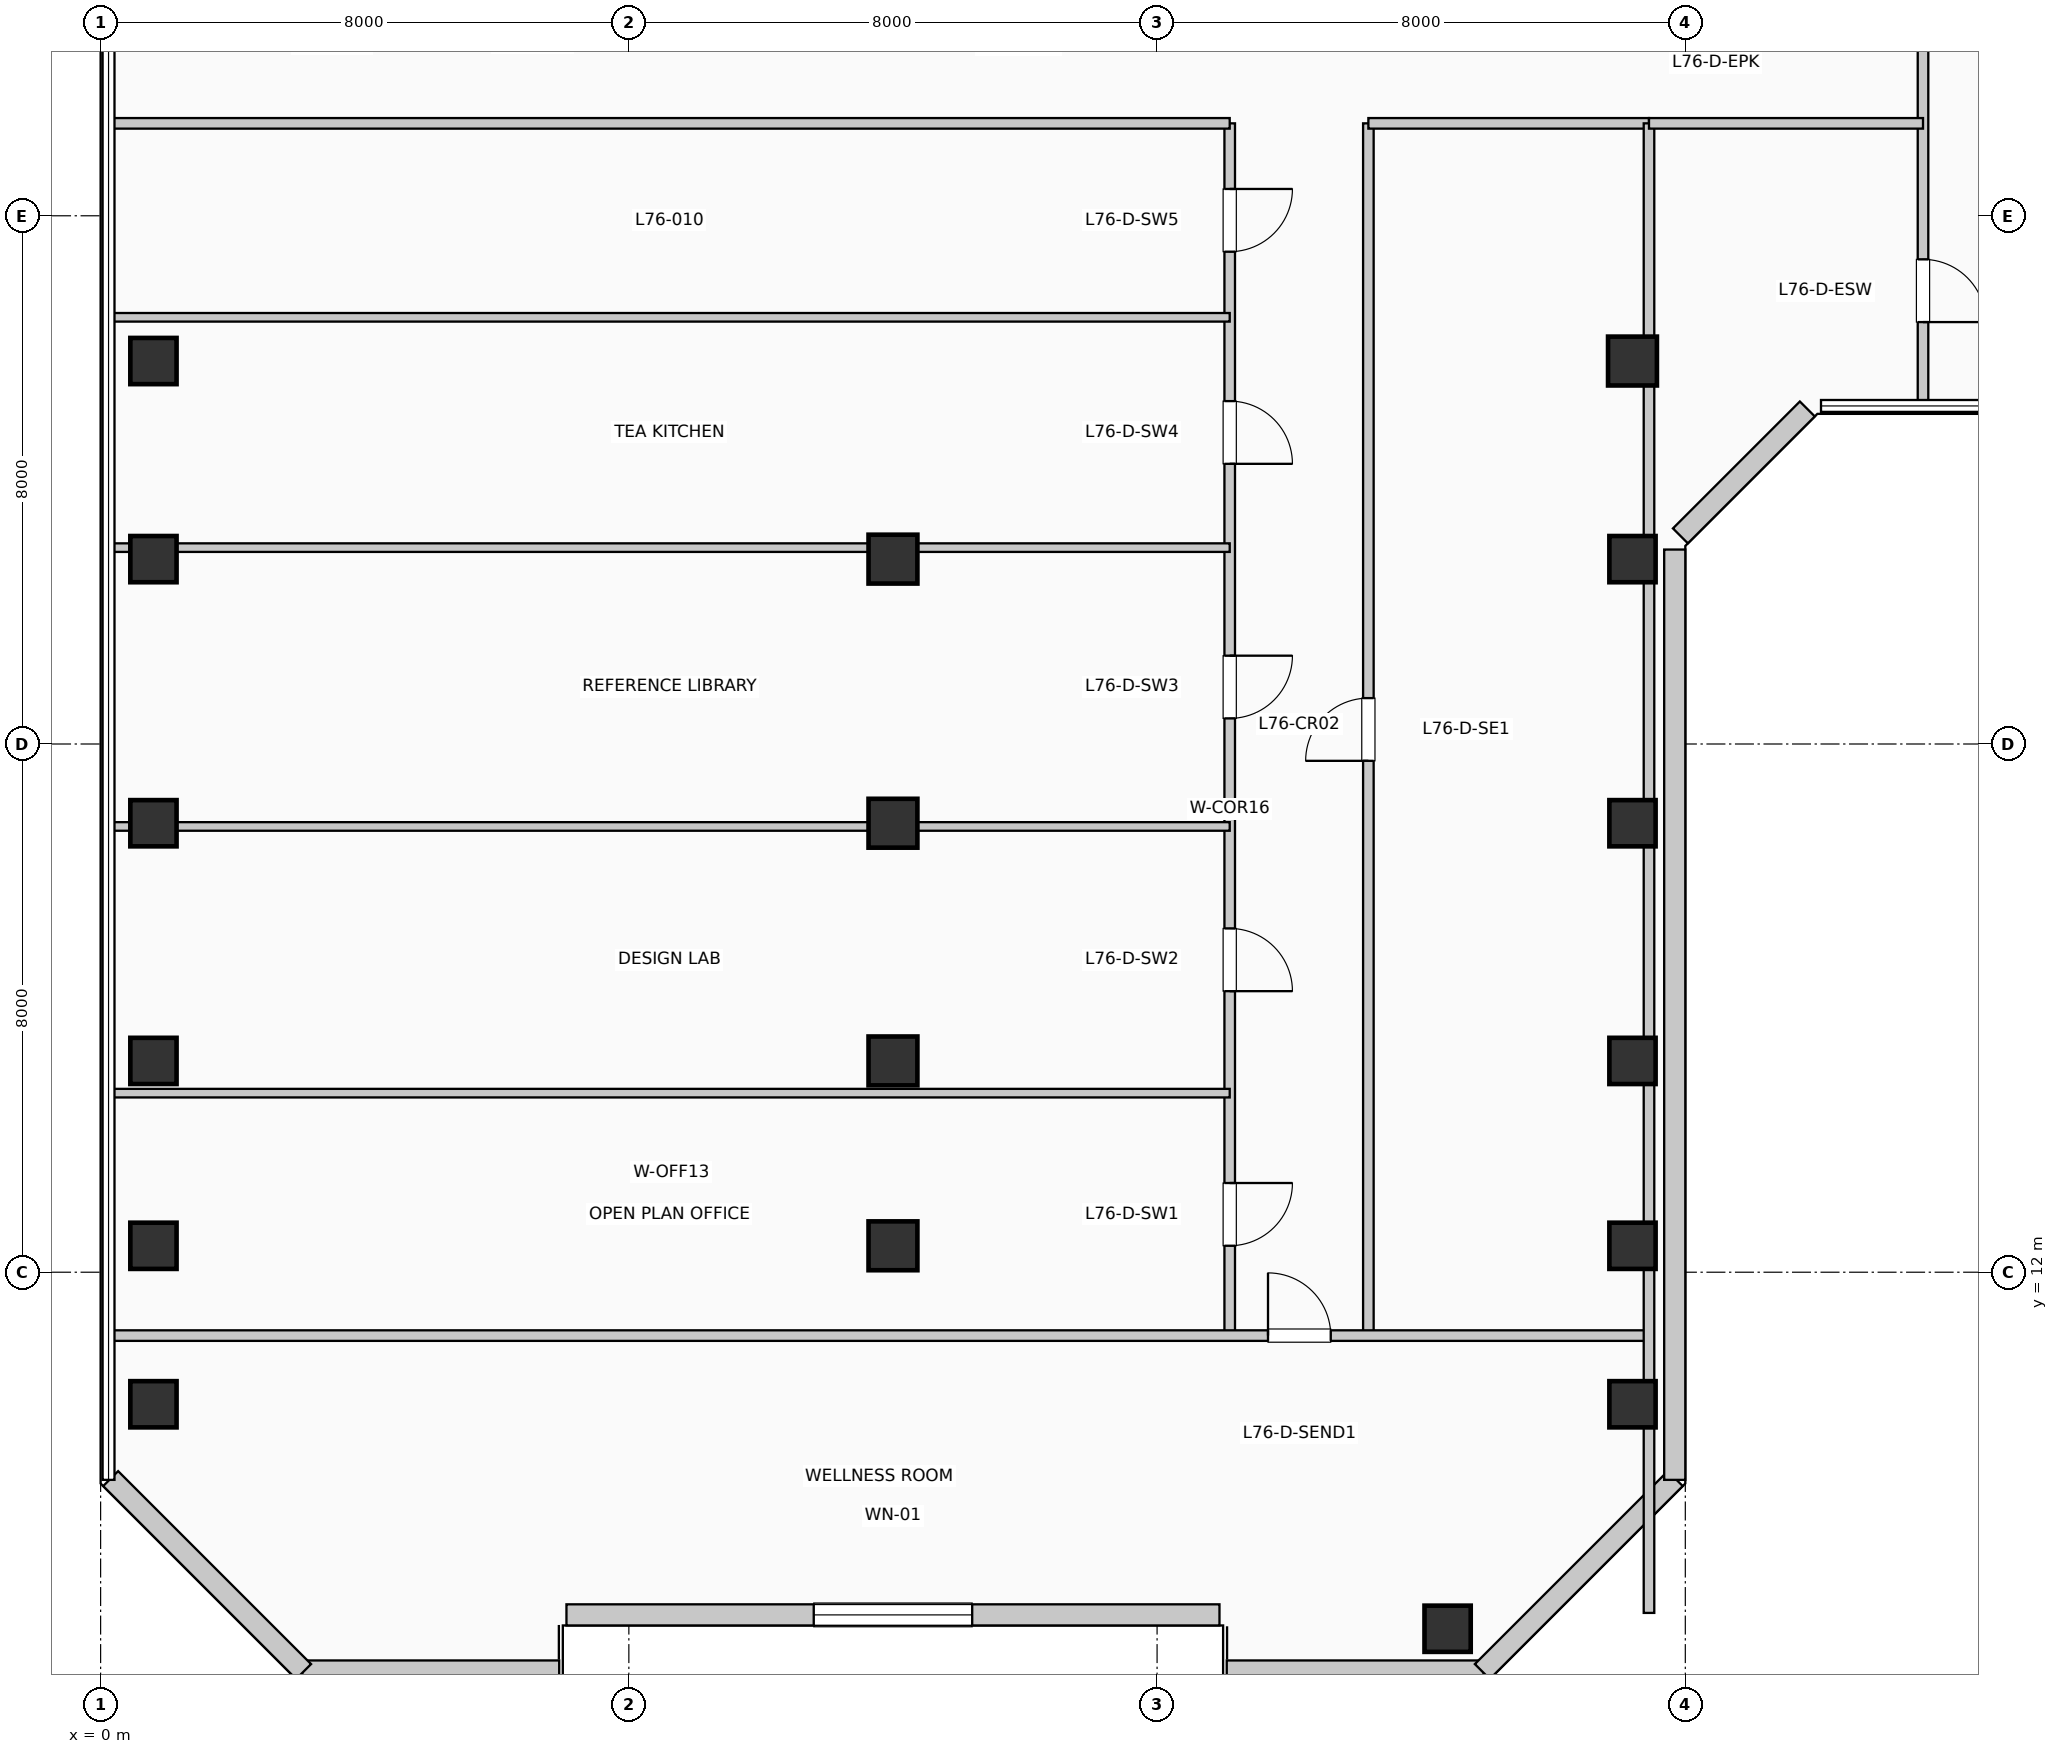
"""IFC4 building model, lengths in metres.
Left out: names, types, materials, properties, quantities, classifications, styles, units other than length and angle.
Written with IfcOpenShell. Run it as: python <this file> out.ifc"""

import sys

from ifc_helpers import new_model, si_unit, direction, frame, frame_2d, origin, origin_2d, place, context, subcontext, project, spatial, rectangle, extrude, element, fill, save


model = new_model("IFC4")
c1 = context("Model", 3, precision=1e-05, world=origin(), true_north=direction((0.0, 1.0)))
c2 = subcontext(c1, "Body", "Model", "MODEL_VIEW")
j1 = project(units=[si_unit("LENGTHUNIT", "METRE"), si_unit("PLANEANGLEUNIT", "RADIAN")], contexts=[c1])
p1 = place(None, origin())
s1 = spatial("IfcSite", under=j1, at=p1, CompositionType="ELEMENT")
p2 = place(p1, origin())
s2 = spatial("IfcBuilding", under=s1, at=p2, CompositionType="ELEMENT")
p3 = place(p2, frame((0.0, 0.0, 311.85)))
s3 = spatial("IfcBuildingStorey", under=s2, at=p3, CompositionType="ELEMENT", Elevation=311.85)
for number, where, z_axis, x_axis in (
    (1, (0.8, 10.0, 0.0), (0.0, 0.0, 1.0), (1.0, 0.0, 0.0)),
    (2, (0.8, 12.4, 0.0), (0.0, 0.0, 1.0), (1.0, 0.0, 0.0)),
    (3, (0.8, 15.2, 0.0), (0.0, 0.0, 1.0), (1.0, 0.0, 0.0)),
    (4, (0.8, 18.8, 0.0), (0.0, 0.0, 1.0), (1.0, 0.0, 0.0)),
    (5, (0.8, 22.8, 0.0), (0.0, 0.0, 1.0), (1.0, 0.0, 0.0)),
    (6, (0.8, 25.8, 0.0), (0.0, 0.0, 1.0), (1.0, 0.0, 0.0)),
):
    element("IfcColumn", number, at=place(p3, frame(where, z_axis=z_axis, x_axis=x_axis)), inside=s3, PredefinedType="COLUMN", context=c2, shape_type="SweptSolid", body=[
        extrude(rectangle(XDim=0.7, YDim=0.7, at=origin_2d()), origin(), (0.0, 0.0, 1.0), 3.96),
    ])
for number, where, z_axis, x_axis in (
    (7, (12.0, 12.4, 0.0), (0.0, 0.0, 1.0), (1.0, 0.0, 0.0)),
    (8, (12.0, 15.2, 0.0), (0.0, 0.0, 1.0), (1.0, 0.0, 0.0)),
    (9, (12.0, 18.8, 0.0), (0.0, 0.0, 1.0), (1.0, 0.0, 0.0)),
    (10, (12.0, 22.8, 0.0), (0.0, 0.0, 1.0), (1.0, 0.0, 0.0)),
):
    element("IfcColumn", number, at=place(p3, frame(where, z_axis=z_axis, x_axis=x_axis)), inside=s3, PredefinedType="COLUMN", context=c2, shape_type="SweptSolid", body=[
        extrude(rectangle(XDim=0.74, YDim=0.74, at=origin_2d()), origin(), (0.0, 0.0, 1.0), 3.96),
    ])
for number, where, z_axis, x_axis in (
    (11, (20.4, 6.6, 0.0), (0.0, 0.0, 1.0), (1.0, 0.0, 0.0)),
    (12, (23.2, 10.0, 0.0), (0.0, 0.0, 1.0), (1.0, 0.0, 0.0)),
    (13, (23.2, 12.4, 0.0), (0.0, 0.0, 1.0), (1.0, 0.0, 0.0)),
    (14, (23.2, 15.2, 0.0), (0.0, 0.0, 1.0), (1.0, 0.0, 0.0)),
    (15, (23.2, 18.8, 0.0), (0.0, 0.0, 1.0), (1.0, 0.0, 0.0)),
    (16, (23.2, 22.8, 0.0), (0.0, 0.0, 1.0), (1.0, 0.0, 0.0)),
):
    element("IfcColumn", number, at=place(p3, frame(where, z_axis=z_axis, x_axis=x_axis)), inside=s3, PredefinedType="COLUMN", context=c2, shape_type="SweptSolid", body=[
        extrude(rectangle(XDim=0.7, YDim=0.7, at=origin_2d()), origin(), (0.0, 0.0, 1.0), 3.96),
    ])
p4 = place(p3, frame((23.2, 25.8, 0.0), z_axis=(0.0, 0.0, 1.0), x_axis=(1.0, 0.0, 0.0)))
e17 = element("IfcColumn", 17, at=p4, inside=s3, PredefinedType="COLUMN", context=c2, shape_type="SweptSolid", body=[
    extrude(rectangle(XDim=0.74, YDim=0.74, at=origin_2d()), origin(), (0.0, 0.0, 1.0), 3.96),
])
p5 = place(p3, frame((3.055, 5.96, 0.0), z_axis=(0.0, 0.0, 1.0), x_axis=(1.0, 0.0, 0.0)))
e18 = element("IfcWall", 18, at=p5, inside=s3, PredefinedType="SOLIDWALL", context=c2, shape_type="SweptSolid", body=[
    extrude(rectangle(XDim=3.89, YDim=0.32, at=frame_2d((1.945, 0.0))), origin(), (0.0, 0.0, 1.0), 3.74),
])
p6 = place(p3, frame((7.055, 6.81, 0.0), z_axis=(0.0, 0.0, 1.0), x_axis=(1.0, 0.0, 0.0)))
e19 = element("IfcWall", 19, at=p6, inside=s3, PredefinedType="SOLIDWALL", context=c2, shape_type="SweptSolid", body=[
    extrude(rectangle(XDim=9.89, YDim=0.32, at=frame_2d((4.945, 0.0))), origin(), (0.0, 0.0, 1.0), 3.74),
])
p7 = place(p6, frame((3.745, 0.0, 0.85)))
e20 = element("IfcOpeningElement", 20, at=p7, cuts=e19, PredefinedType="OPENING", context=c2, shape_type="SweptSolid", body=[
    extrude(rectangle(XDim=2.4, YDim=2.05, at=frame_2d((1.2, 1.025))), frame((0.0, 0.17, 0.0), z_axis=(0.0, -1.0, 0.0), x_axis=(1.0, 0.0, 0.0)), (0.0, 0.0, 1.0), 0.34),
])
p8 = place(p3, frame((17.055, 5.96, 0.0), z_axis=(0.0, 0.0, 1.0), x_axis=(1.0, 0.0, 0.0)))
e21 = element("IfcWall", 21, at=p8, inside=s3, PredefinedType="SOLIDWALL", context=c2, shape_type="SweptSolid", body=[
    extrude(rectangle(XDim=3.89, YDim=0.32, at=frame_2d((1.945, 0.0))), origin(), (0.0, 0.0, 1.0), 3.74),
])
p9 = place(p3, frame((20.926, 5.952, 0.0), z_axis=(0.0, 0.0, 1.0), x_axis=(0.707077242712, 0.707136318428, 0.0)))
e22 = element("IfcWall", 22, at=p9, inside=s3, PredefinedType="SOLIDWALL", context=c2, shape_type="SweptSolid", body=[
    extrude(rectangle(XDim=4.133, YDim=0.32, at=frame_2d((2.066, 0.0))), origin(), (0.0, 0.0, 1.0), 3.74),
])
p10 = place(p3, frame((23.84, 8.855, 0.0), z_axis=(0.0, 0.0, 1.0), x_axis=(0.0, 1.0, 0.0)))
e23 = element("IfcWall", 23, at=p10, inside=s3, PredefinedType="SOLIDWALL", context=c2, shape_type="SweptSolid", body=[
    extrude(rectangle(XDim=14.09, YDim=0.32, at=frame_2d((7.045, 0.0))), origin(), (0.0, 0.0, 1.0), 3.74),
])
p11 = place(p3, frame((23.926, 23.152, 0.0), z_axis=(0.0, 0.0, 1.0), x_axis=(0.707106781187, 0.707106781187, 0.0)))
e24 = element("IfcWall", 24, at=p11, inside=s3, PredefinedType="SOLIDWALL", context=c2, shape_type="SweptSolid", body=[
    extrude(rectangle(XDim=2.718, YDim=0.32, at=frame_2d((1.359, 0.0))), origin(), (0.0, 0.0, 1.0), 3.74),
])
p12 = place(p3, frame((0.152, 8.874, 0.0), z_axis=(0.0, 0.0, 1.0), x_axis=(0.707077242712, -0.707136318428, 0.0)))
e25 = element("IfcWall", 25, at=p12, inside=s3, PredefinedType="SOLIDWALL", context=c2, shape_type="SweptSolid", body=[
    extrude(rectangle(XDim=4.133, YDim=0.32, at=frame_2d((2.066, 0.0))), origin(), (0.0, 0.0, 1.0), 3.74),
])
p13 = place(p3, frame((17.1, 11.04, 0.0), z_axis=(0.0, 0.0, 1.0), x_axis=(0.0, 1.0, 0.0)))
e26 = element("IfcWall", 26, at=p13, inside=s3, PredefinedType="PARTITIONING", context=c2, shape_type="SweptSolid", body=[
    extrude(rectangle(XDim=18.36, YDim=0.16, at=frame_2d((9.18, 0.0))), origin(), (0.0, 0.0, 1.0), 3.74),
])
p14 = place(p13, frame((2.311, 0.0, 0.0), z_axis=(0.0, 0.0, 1.0), x_axis=(-1.0, 0.0, 0.0)))
e27 = element("IfcOpeningElement", 27, at=p14, cuts=e26, PredefinedType="OPENING", context=c2, shape_type="SweptSolid", body=[
    extrude(rectangle(XDim=0.95, YDim=2.15, at=frame_2d((0.475, 1.075))), frame((0.0, 0.09, 0.0), z_axis=(0.0, -1.0, 0.0), x_axis=(1.0, 0.0, 0.0)), (0.0, 0.0, 1.0), 0.18),
])
p15 = place(p13, frame((6.167, 0.0, 0.0), z_axis=(0.0, 0.0, 1.0), x_axis=(-1.0, 0.0, 0.0)))
e28 = element("IfcOpeningElement", 28, at=p15, cuts=e26, PredefinedType="OPENING", context=c2, shape_type="SweptSolid", body=[
    extrude(rectangle(XDim=0.95, YDim=2.15, at=frame_2d((0.475, 1.075))), frame((0.0, 0.09, 0.0), z_axis=(0.0, -1.0, 0.0), x_axis=(1.0, 0.0, 0.0)), (0.0, 0.0, 1.0), 0.18),
])
p16 = place(p13, frame((10.298, 0.0, 0.0), z_axis=(0.0, 0.0, 1.0), x_axis=(-1.0, 0.0, 0.0)))
e29 = element("IfcOpeningElement", 29, at=p16, cuts=e26, PredefinedType="OPENING", context=c2, shape_type="SweptSolid", body=[
    extrude(rectangle(XDim=0.95, YDim=2.15, at=frame_2d((0.475, 1.075))), frame((0.0, 0.09, 0.0), z_axis=(0.0, -1.0, 0.0), x_axis=(1.0, 0.0, 0.0)), (0.0, 0.0, 1.0), 0.18),
])
p17 = place(p13, frame((14.153, 0.0, 0.0), z_axis=(0.0, 0.0, 1.0), x_axis=(-1.0, 0.0, 0.0)))
e30 = element("IfcOpeningElement", 30, at=p17, cuts=e26, PredefinedType="OPENING", context=c2, shape_type="SweptSolid", body=[
    extrude(rectangle(XDim=0.95, YDim=2.15, at=frame_2d((0.475, 1.075))), frame((0.0, 0.09, 0.0), z_axis=(0.0, -1.0, 0.0), x_axis=(1.0, 0.0, 0.0)), (0.0, 0.0, 1.0), 0.18),
])
p18 = place(p13, frame((17.366, 0.0, 0.0), z_axis=(0.0, 0.0, 1.0), x_axis=(-1.0, 0.0, 0.0)))
e31 = element("IfcOpeningElement", 31, at=p18, cuts=e26, PredefinedType="OPENING", context=c2, shape_type="SweptSolid", body=[
    extrude(rectangle(XDim=0.95, YDim=2.15, at=frame_2d((0.475, 1.075))), frame((0.0, 0.09, 0.0), z_axis=(0.0, -1.0, 0.0), x_axis=(1.0, 0.0, 0.0)), (0.0, 0.0, 1.0), 0.18),
])
p19 = place(p3, frame((19.2, 11.04, 0.0), z_axis=(0.0, 0.0, 1.0), x_axis=(0.0, 1.0, 0.0)))
e32 = element("IfcWall", 32, at=p19, inside=s3, PredefinedType="PARTITIONING", context=c2, shape_type="SweptSolid", body=[
    extrude(rectangle(XDim=18.36, YDim=0.16, at=frame_2d((9.18, 0.0))), origin(), (0.0, 0.0, 1.0), 3.74),
])
p20 = place(p19, frame((8.705, 0.0, 0.0)))
e33 = element("IfcOpeningElement", 33, at=p20, cuts=e32, PredefinedType="OPENING", context=c2, shape_type="SweptSolid", body=[
    extrude(rectangle(XDim=0.95, YDim=2.15, at=frame_2d((0.475, 1.075))), frame((0.0, 0.09, 0.0), z_axis=(0.0, -1.0, 0.0), x_axis=(1.0, 0.0, 0.0)), (0.0, 0.0, 1.0), 0.18),
])
p21 = place(p3, frame((0.19, 11.04, 0.0), z_axis=(0.0, 0.0, 1.0), x_axis=(1.0, 0.0, 0.0)))
e34 = element("IfcWall", 34, at=p21, inside=s3, PredefinedType="PARTITIONING", context=c2, shape_type="SweptSolid", body=[
    extrude(rectangle(XDim=23.26, YDim=0.16, at=frame_2d((11.63, 0.0))), origin(), (0.0, 0.0, 1.0), 3.74),
])
p22 = place(p21, frame((17.49, 0.0, 0.0)))
e35 = element("IfcOpeningElement", 35, at=p22, cuts=e34, PredefinedType="OPENING", context=c2, shape_type="SweptSolid", body=[
    extrude(rectangle(XDim=0.95, YDim=2.15, at=frame_2d((0.475, 1.075))), frame((0.0, 0.09, 0.0), z_axis=(0.0, -1.0, 0.0), x_axis=(1.0, 0.0, 0.0)), (0.0, 0.0, 1.0), 0.18),
])
p23 = place(p3, frame((0.19, 29.4, 0.0), z_axis=(0.0, 0.0, 1.0), x_axis=(1.0, 0.0, 0.0)))
e36 = element("IfcWall", 36, at=p23, inside=s3, PredefinedType="PARTITIONING", context=c2, shape_type="SweptSolid", body=[
    extrude(rectangle(XDim=16.91, YDim=0.16, at=frame_2d((8.455, 0.0))), origin(), (0.0, 0.0, 1.0), 3.425),
])
p24 = place(p3, frame((19.2, 29.4, 0.0), z_axis=(0.0, 0.0, 1.0), x_axis=(1.0, 0.0, 0.0)))
e37 = element("IfcWall", 37, at=p24, inside=s3, PredefinedType="PARTITIONING", context=c2, shape_type="SweptSolid", body=[
    extrude(rectangle(XDim=4.25, YDim=0.16, at=frame_2d((2.125, 0.0))), origin(), (0.0, 0.0, 1.0), 3.425),
])
p25 = place(p3, frame((23.45, 6.84, 0.0), z_axis=(0.0, 0.0, 1.0), x_axis=(0.0, 1.0, 0.0)))
e38 = element("IfcWall", 38, at=p25, inside=s3, PredefinedType="PARTITIONING", context=c2, shape_type="SweptSolid", body=[
    extrude(rectangle(XDim=22.56, YDim=0.16, at=frame_2d((11.28, 0.0))), origin(), (0.0, 0.0, 1.0), 3.175),
])
p26 = place(p3, frame((0.19, 14.712, 0.0), z_axis=(0.0, 0.0, 1.0), x_axis=(1.0, 0.0, 0.0)))
e39 = element("IfcWall", 39, at=p26, inside=s3, PredefinedType="PARTITIONING", context=c2, shape_type="SweptSolid", body=[
    extrude(rectangle(XDim=16.91, YDim=0.13, at=frame_2d((8.455, 0.0))), origin(), (0.0, 0.0, 1.0), 3.74),
])
for number, where, z_axis, x_axis in (
    (40, (0.19, 18.751, 0.0), (0.0, 0.0, 1.0), (1.0, 0.0, 0.0)),
    (41, (0.19, 22.974, 0.0), (0.0, 0.0, 1.0), (1.0, 0.0, 0.0)),
):
    element("IfcWall", number, at=place(p3, frame(where, z_axis=z_axis, x_axis=x_axis)), inside=s3, PredefinedType="PARTITIONING", context=c2, shape_type="SweptSolid", body=[
        extrude(rectangle(XDim=16.91, YDim=0.13, at=frame_2d((8.455, 0.0))), origin(), (0.0, 0.0, 1.0), 3.175),
    ])
p27 = place(p3, frame((0.19, 26.462, 0.0), z_axis=(0.0, 0.0, 1.0), x_axis=(1.0, 0.0, 0.0)))
e42 = element("IfcWall", 42, at=p27, inside=s3, PredefinedType="PARTITIONING", context=c2, shape_type="SweptSolid", body=[
    extrude(rectangle(XDim=16.91, YDim=0.13, at=frame_2d((8.455, 0.0))), origin(), (0.0, 0.0, 1.0), 3.74),
])
p28 = place(p3, frame((27.6, 25.19, 0.0), z_axis=(0.0, 0.0, 1.0), x_axis=(0.0, 1.0, 0.0)))
e43 = element("IfcWall", 43, at=p28, inside=s3, PredefinedType="PARTITIONING", context=c2, shape_type="SweptSolid", body=[
    extrude(rectangle(XDim=12.01, YDim=0.16, at=frame_2d((6.005, 0.0))), origin(), (0.0, 0.0, 1.0), 3.74),
])
p29 = place(p28, frame((2.15, 0.0, 0.0), z_axis=(0.0, 0.0, 1.0), x_axis=(-1.0, 0.0, 0.0)))
e44 = element("IfcOpeningElement", 44, at=p29, cuts=e43, PredefinedType="OPENING", context=c2, shape_type="SweptSolid", body=[
    extrude(rectangle(XDim=0.95, YDim=2.15, at=frame_2d((0.475, 1.075))), frame((0.0, 0.09, 0.0), z_axis=(0.0, -1.0, 0.0), x_axis=(1.0, 0.0, 0.0)), (0.0, 0.0, 1.0), 0.18),
])
p30 = place(p3, frame((23.45, 29.4, 0.0), z_axis=(0.0, 0.0, 1.0), x_axis=(1.0, 0.0, 0.0)))
e45 = element("IfcWall", 45, at=p30, inside=s3, PredefinedType="PARTITIONING", context=c2, shape_type="SweptSolid", body=[
    extrude(rectangle(XDim=4.15, YDim=0.16, at=frame_2d((2.075, 0.0))), origin(), (0.0, 0.0, 1.0), 3.425),
])
p31 = place(p7, origin())
e46 = element("IfcWindow", 46, at=p31, inside=s3, PartitioningType="SINGLE_PANEL", PredefinedType="WINDOW", context=c2, shape_type="SweptSolid", body=[
    extrude(rectangle(XDim=2.4, YDim=2.05, at=frame_2d((1.2, 1.025))), frame((0.0, 0.03, 0.0), z_axis=(0.0, -1.0, 0.0), x_axis=(1.0, 0.0, 0.0)), (0.0, 0.0, 1.0), 0.06),
])
fill(e20, e46)
p32 = place(p22, origin())
e47 = element("IfcDoor", 47, at=p32, inside=s3, OperationType="SINGLE_SWING_LEFT", PredefinedType="DOOR", context=c2, shape_type="SweptSolid", body=[
    extrude(rectangle(XDim=0.95, YDim=2.15, at=frame_2d((0.475, 1.075))), frame((0.0, 0.025, 0.0), z_axis=(0.0, -1.0, 0.0), x_axis=(1.0, 0.0, 0.0)), (0.0, 0.0, 1.0), 0.05),
])
fill(e35, e47)
p33 = place(p14, origin())
e48 = element("IfcDoor", 48, at=p33, inside=s3, OperationType="SINGLE_SWING_RIGHT", PredefinedType="DOOR", context=c2, shape_type="SweptSolid", body=[
    extrude(rectangle(XDim=0.95, YDim=2.15, at=frame_2d((0.475, 1.075))), frame((0.0, 0.025, 0.0), z_axis=(0.0, -1.0, 0.0), x_axis=(1.0, 0.0, 0.0)), (0.0, 0.0, 1.0), 0.05),
])
fill(e27, e48)
p34 = place(p15, origin())
e49 = element("IfcDoor", 49, at=p34, inside=s3, OperationType="SINGLE_SWING_LEFT", PredefinedType="DOOR", context=c2, shape_type="SweptSolid", body=[
    extrude(rectangle(XDim=0.95, YDim=2.15, at=frame_2d((0.475, 1.075))), frame((0.0, 0.025, 0.0), z_axis=(0.0, -1.0, 0.0), x_axis=(1.0, 0.0, 0.0)), (0.0, 0.0, 1.0), 0.05),
])
fill(e28, e49)
p35 = place(p16, origin())
e50 = element("IfcDoor", 50, at=p35, inside=s3, OperationType="SINGLE_SWING_RIGHT", PredefinedType="DOOR", context=c2, shape_type="SweptSolid", body=[
    extrude(rectangle(XDim=0.95, YDim=2.15, at=frame_2d((0.475, 1.075))), frame((0.0, 0.025, 0.0), z_axis=(0.0, -1.0, 0.0), x_axis=(1.0, 0.0, 0.0)), (0.0, 0.0, 1.0), 0.05),
])
fill(e29, e50)
p36 = place(p17, origin())
e51 = element("IfcDoor", 51, at=p36, inside=s3, OperationType="SINGLE_SWING_LEFT", PredefinedType="DOOR", context=c2, shape_type="SweptSolid", body=[
    extrude(rectangle(XDim=0.95, YDim=2.15, at=frame_2d((0.475, 1.075))), frame((0.0, 0.025, 0.0), z_axis=(0.0, -1.0, 0.0), x_axis=(1.0, 0.0, 0.0)), (0.0, 0.0, 1.0), 0.05),
])
fill(e30, e51)
p37 = place(p18, origin())
e52 = element("IfcDoor", 52, at=p37, inside=s3, OperationType="SINGLE_SWING_RIGHT", PredefinedType="DOOR", context=c2, shape_type="SweptSolid", body=[
    extrude(rectangle(XDim=0.95, YDim=2.15, at=frame_2d((0.475, 1.075))), frame((0.0, 0.025, 0.0), z_axis=(0.0, -1.0, 0.0), x_axis=(1.0, 0.0, 0.0)), (0.0, 0.0, 1.0), 0.05),
])
fill(e31, e52)
p38 = place(p20, origin())
e53 = element("IfcDoor", 53, at=p38, inside=s3, OperationType="SINGLE_SWING_LEFT", PredefinedType="DOOR", context=c2, shape_type="SweptSolid", body=[
    extrude(rectangle(XDim=0.95, YDim=2.15, at=frame_2d((0.475, 1.075))), frame((0.0, 0.025, 0.0), z_axis=(0.0, -1.0, 0.0), x_axis=(1.0, 0.0, 0.0)), (0.0, 0.0, 1.0), 0.05),
])
fill(e33, e53)
p39 = place(p29, origin())
e54 = element("IfcDoor", 54, at=p39, inside=s3, OperationType="SINGLE_SWING_LEFT", PredefinedType="DOOR", context=c2, shape_type="SweptSolid", body=[
    extrude(rectangle(XDim=0.95, YDim=2.15, at=frame_2d((0.475, 1.075))), frame((0.0, 0.025, 0.0), z_axis=(0.0, -1.0, 0.0), x_axis=(1.0, 0.0, 0.0)), (0.0, 0.0, 1.0), 0.05),
])
fill(e44, e54)
save(model, sys.argv[1])
